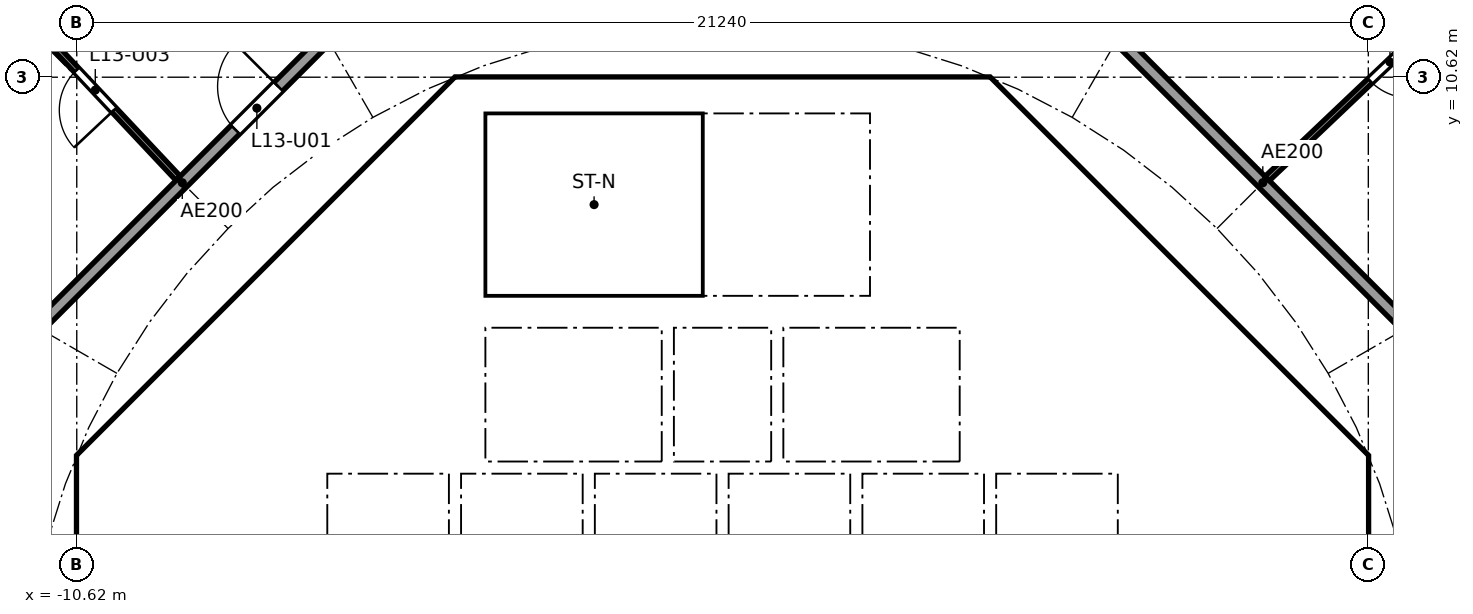
"""IFC4 building model, lengths in metres.
Left out: names, types, materials, properties, quantities, classifications, styles, units other than length and angle.
Written with IfcOpenShell. Run it as: python <this file> out.ifc"""

import sys

from ifc_helpers import new_model, si_unit, direction, frame, frame_2d, origin, place, context, subcontext, project, spatial, polyline, rectangle, outline, extrude, element, fill, save


model = new_model("IFC4")
c1 = context("Model", 3, precision=1e-05, world=origin(), true_north=direction((0.0, 1.0)))
c2 = subcontext(c1, "Body", "Model", "MODEL_VIEW")
j1 = project(units=[si_unit("LENGTHUNIT", "METRE"), si_unit("PLANEANGLEUNIT", "RADIAN")], contexts=[c1])
p1 = place(None, origin())
s1 = spatial("IfcSite", under=j1, at=p1, CompositionType="ELEMENT")
p2 = place(p1, origin())
s2 = spatial("IfcBuilding", under=s1, at=p2, CompositionType="ELEMENT")
p3 = place(p2, frame((0.0, 0.0, 56.6)))
s3 = spatial("IfcBuildingStorey", under=s2, at=p3, CompositionType="ELEMENT", Elevation=56.6)
p4 = place(p3, frame((9.988, 4.613, 0.0), z_axis=(0.0, 0.0, 1.0), x_axis=(-0.707106781187, 0.707106781187, 0.0)))
e1 = element("IfcWall", 1, at=p4, inside=s3, PredefinedType="SHEAR", context=c2, shape_type="SweptSolid", body=[
    extrude(rectangle(XDim=7.602, YDim=0.6, at=frame_2d((3.801, 0.0))), origin(), (0.0, 0.0, 1.0), 3.44),
])
p5 = place(p4, frame((3.201, 0.0, 0.0)))
e2 = element("IfcOpeningElement", 2, at=p5, cuts=e1, PredefinedType="OPENING", context=c2, shape_type="SweptSolid", body=[
    extrude(rectangle(XDim=1.2, YDim=2.1, at=frame_2d((0.6, 1.05))), frame((0.0, 0.31, 0.0), z_axis=(0.0, -1.0, 0.0), x_axis=(1.0, 0.0, 0.0)), (0.0, 0.0, 1.0), 0.62),
])
p6 = place(p3, frame((-4.613, 9.988, 0.0), z_axis=(0.0, 0.0, 1.0), x_axis=(-0.707106781187, -0.707106781187, 0.0)))
e3 = element("IfcWall", 3, at=p6, inside=s3, PredefinedType="SHEAR", context=c2, shape_type="SweptSolid", body=[
    extrude(rectangle(XDim=7.602, YDim=0.6, at=frame_2d((3.801, 0.0))), origin(), (0.0, 0.0, 1.0), 3.44),
])
p7 = place(p6, frame((0.351, 0.0, 0.0)))
e4 = element("IfcOpeningElement", 4, at=p7, cuts=e3, PredefinedType="OPENING", context=c2, shape_type="SweptSolid", body=[
    extrude(rectangle(XDim=1.1, YDim=2.1, at=frame_2d((0.55, 1.05))), frame((0.0, 0.31, 0.0), z_axis=(0.0, -1.0, 0.0), x_axis=(1.0, 0.0, 0.0)), (0.0, 0.0, 1.0), 0.62),
])
p8 = place(p3, frame((-10.325, 3.801, 0.0), z_axis=(0.0, 0.0, 1.0), x_axis=(0.0, -1.0, 0.0)))
e5 = element("IfcWall", 5, at=p8, inside=s3, PredefinedType="SHEAR", context=c2, shape_type="SweptSolid", body=[
    extrude(rectangle(XDim=7.602, YDim=0.6, at=frame_2d((3.801, 0.0))), origin(), (0.0, 0.0, 1.0), 3.44),
])
p9 = place(p8, frame((0.651, 0.0, 0.0)))
e6 = element("IfcOpeningElement", 6, at=p9, cuts=e5, PredefinedType="OPENING", context=c2, shape_type="SweptSolid", body=[
    extrude(rectangle(XDim=1.5, YDim=2.1, at=frame_2d((0.75, 1.05))), frame((0.0, 0.31, 0.0), z_axis=(0.0, -1.0, 0.0), x_axis=(1.0, 0.0, 0.0)), (0.0, 0.0, 1.0), 0.62),
])
p10 = place(p8, frame((5.451, 0.0, 0.0)))
e7 = element("IfcOpeningElement", 7, at=p10, cuts=e5, PredefinedType="OPENING", context=c2, shape_type="SweptSolid", body=[
    extrude(rectangle(XDim=1.5, YDim=2.1, at=frame_2d((0.75, 1.05))), frame((0.0, 0.31, 0.0), z_axis=(0.0, -1.0, 0.0), x_axis=(1.0, 0.0, 0.0)), (0.0, 0.0, 1.0), 0.62),
])
p11 = place(p3, frame((-5.8, 4.3, 0.0), z_axis=(0.0, 0.0, 1.0), x_axis=(0.0, 1.0, 0.0)))
e8 = element("IfcWall", 8, at=p11, inside=s3, PredefinedType="PARTITIONING", context=c2, shape_type="SweptSolid", body=[
    extrude(rectangle(XDim=3.927, YDim=0.15, at=frame_2d((1.963, 0.0))), origin(), (0.0, 0.0, 1.0), 3.44),
])
p12 = place(p11, frame((0.413, 0.0, 0.0)))
e9 = element("IfcOpeningElement", 9, at=p12, cuts=e8, PredefinedType="OPENING", context=c2, shape_type="SweptSolid", body=[
    extrude(rectangle(XDim=0.9, YDim=2.1, at=frame_2d((0.45, 1.05))), frame((0.0, 0.085, 0.0), z_axis=(0.0, -1.0, 0.0), x_axis=(1.0, 0.0, 0.0)), (0.0, 0.0, 1.0), 0.17),
])
p13 = place(p11, frame((2.489, 0.0, 0.0)))
e10 = element("IfcOpeningElement", 10, at=p13, cuts=e8, PredefinedType="OPENING", context=c2, shape_type="SweptSolid", body=[
    extrude(rectangle(XDim=0.9, YDim=2.1, at=frame_2d((0.45, 1.05))), frame((0.0, 0.085, 0.0), z_axis=(0.0, -1.0, 0.0), x_axis=(1.0, 0.0, 0.0)), (0.0, 0.0, 1.0), 0.17),
])
p14 = place(p3, frame((4.0, 4.3, 0.0), z_axis=(0.0, 0.0, 1.0), x_axis=(0.0, 1.0, 0.0)))
e11 = element("IfcWall", 11, at=p14, inside=s3, PredefinedType="SOLIDWALL", context=c2, shape_type="SweptSolid", body=[
    extrude(rectangle(XDim=2.2, YDim=0.2, at=frame_2d((1.1, 0.0))), origin(), (0.0, 0.0, 1.0), 3.44),
])
p15 = place(p14, frame((0.55, 0.0, 0.0)))
e12 = element("IfcOpeningElement", 12, at=p15, cuts=e11, PredefinedType="OPENING", context=c2, shape_type="SweptSolid", body=[
    extrude(rectangle(XDim=1.1, YDim=2.1, at=frame_2d((0.55, 1.05))), frame((0.0, 0.11, 0.0), z_axis=(0.0, -1.0, 0.0), x_axis=(1.0, 0.0, 0.0)), (0.0, 0.0, 1.0), 0.22),
])
p16 = place(p3, frame((-4.0, 4.3, 0.0), z_axis=(0.0, 0.0, 1.0), x_axis=(0.0, 1.0, 0.0)))
e13 = element("IfcWall", 13, at=p16, inside=s3, PredefinedType="SOLIDWALL", context=c2, shape_type="SweptSolid", body=[
    extrude(rectangle(XDim=2.2, YDim=0.2, at=frame_2d((1.1, 0.0))), origin(), (0.0, 0.0, 1.0), 3.44),
])
p17 = place(p16, frame((0.55, 0.0, 0.0)))
e14 = element("IfcOpeningElement", 14, at=p17, cuts=e13, PredefinedType="OPENING", context=c2, shape_type="SweptSolid", body=[
    extrude(rectangle(XDim=1.1, YDim=2.1, at=frame_2d((0.55, 1.05))), frame((0.0, 0.11, 0.0), z_axis=(0.0, -1.0, 0.0), x_axis=(1.0, 0.0, 0.0)), (0.0, 0.0, 1.0), 0.22),
])
p18 = place(p3, frame((6.7, 4.0, 0.0), z_axis=(0.0, 0.0, 1.0), x_axis=(1.0, 0.0, 0.0)))
e15 = element("IfcWall", 15, at=p18, inside=s3, PredefinedType="SOLIDWALL", context=c2, shape_type="SweptSolid", body=[
    extrude(rectangle(XDim=3.325, YDim=0.2, at=frame_2d((1.662, 0.0))), origin(), (0.0, 0.0, 1.0), 3.44),
])
p19 = place(p18, frame((1.25, 0.0, 0.0)))
e16 = element("IfcOpeningElement", 16, at=p19, cuts=e15, PredefinedType="OPENING", context=c2, shape_type="SweptSolid", body=[
    extrude(rectangle(XDim=1.1, YDim=2.1, at=frame_2d((0.55, 1.05))), frame((0.0, 0.11, 0.0), z_axis=(0.0, -1.0, 0.0), x_axis=(1.0, 0.0, 0.0)), (0.0, 0.0, 1.0), 0.22),
])
p20 = place(p3, frame((4.0, 7.025, 0.0), z_axis=(0.0, 0.0, 1.0), x_axis=(0.0, 1.0, 0.0)))
e17 = element("IfcWall", 17, at=p20, inside=s3, PredefinedType="SOLIDWALL", context=c2, shape_type="SweptSolid", body=[
    extrude(rectangle(XDim=3.0, YDim=0.2, at=frame_2d((1.5, 0.0))), origin(), (0.0, 0.0, 1.0), 3.44),
])
p21 = place(p20, frame((0.925, 0.0, 0.0)))
e18 = element("IfcOpeningElement", 18, at=p21, cuts=e17, PredefinedType="OPENING", context=c2, shape_type="SweptSolid", body=[
    extrude(rectangle(XDim=1.1, YDim=2.1, at=frame_2d((0.55, 1.05))), frame((0.0, 0.11, 0.0), z_axis=(0.0, -1.0, 0.0), x_axis=(1.0, 0.0, 0.0)), (0.0, 0.0, 1.0), 0.22),
])
p22 = place(p3, origin())
e19 = element("IfcWall", 19, at=p22, inside=s3, PredefinedType="SHEAR", context=c2, shape_type="SweptSolid", body=[
    extrude(outline(polyline([(-10.2, 4.825), (-9.776, 4.401), (-10.025, 4.152), (-10.025, 3.801), (-10.625, 3.801), (-10.625, 4.401), (-10.2, 4.825)])), origin(), (0.0, 0.0, 1.0), 3.44),
])
p23 = place(p3, origin())
e20 = element("IfcWall", 20, at=p23, inside=s3, PredefinedType="SHEAR", context=c2, shape_type="SweptSolid", body=[
    extrude(outline(polyline([(-4.152, 10.025), (-4.401, 9.776), (-4.825, 10.2), (-4.401, 10.625), (4.401, 10.625), (4.825, 10.2), (4.401, 9.776), (4.152, 10.025), (-4.152, 10.025)])), origin(), (0.0, 0.0, 1.0), 3.44),
])
p24 = place(p3, origin())
e21 = element("IfcWall", 21, at=p24, inside=s3, PredefinedType="SHEAR", context=c2, shape_type="SweptSolid", body=[
    extrude(outline(polyline([(9.776, -4.401), (10.025, -4.152), (10.025, -3.801), (10.025, 4.152), (9.776, 4.401), (10.2, 4.825), (10.625, 4.401), (10.625, -4.401), (10.2, -4.825), (9.776, -4.401)])), origin(), (0.0, 0.0, 1.0), 3.44),
])
p25 = place(p3, frame((-10.025, 4.0, 0.0), z_axis=(0.0, 0.0, 1.0), x_axis=(1.0, 0.0, 0.0)))
e22 = element("IfcWall", 22, at=p25, inside=s3, PredefinedType="PARTITIONING", context=c2, shape_type="SweptSolid", body=[
    extrude(rectangle(XDim=3.325, YDim=0.2, at=frame_2d((1.662, 0.0))), origin(), (0.0, 0.0, 1.0), 3.44),
])
p26 = place(p3, frame((-8.001, 6.1, 0.0), z_axis=(0.0, 0.0, 1.0), x_axis=(1.0, 0.0, 0.0)))
e23 = element("IfcWall", 23, at=p26, inside=s3, PredefinedType="PARTITIONING", context=c2, shape_type="SweptSolid", body=[
    extrude(rectangle(XDim=2.126, YDim=0.15, at=frame_2d((1.063, 0.0))), origin(), (0.0, 0.0, 1.0), 3.44),
])
for number, where, z_axis, x_axis in (
    (24, (-0.9, 4.3, 0.0), (0.0, 0.0, 1.0), (0.0, 1.0, 0.0)),
    (25, (0.9, 4.3, 0.0), (0.0, 0.0, 1.0), (0.0, 1.0, 0.0)),
):
    element("IfcWall", number, at=place(p3, frame(where, z_axis=z_axis, x_axis=x_axis)), inside=s3, PredefinedType="SOLIDWALL", context=c2, shape_type="SweptSolid", body=[
        extrude(rectangle(XDim=2.2, YDim=0.2, at=frame_2d((1.1, 0.0))), origin(), (0.0, 0.0, 1.0), 3.44),
    ])
p27 = place(p3, origin())
e26 = element("IfcWall", 26, at=p27, inside=s3, PredefinedType="SOLIDWALL", context=c2, shape_type="SweptSolid", body=[
    extrude(outline(polyline([(-6.5, 2.1), (-6.7, 2.1), (-6.7, 4.3), (6.7, 4.3), (6.7, 2.1), (6.5, 2.1), (6.5, 4.1), (4.5, 4.1), (4.5, 2.1), (4.3, 2.1), (4.3, 4.1), (2.3, 4.1), (2.3, 2.1), (2.1, 2.1), (2.1, 4.1), (0.1, 4.1), (0.1, 2.1), (-0.1, 2.1), (-0.1, 4.1), (-2.1, 4.1), (-2.1, 2.1), (-2.3, 2.1), (-2.3, 4.1), (-4.3, 4.1), (-4.3, 2.1), (-4.5, 2.1), (-4.5, 4.1), (-6.5, 4.1), (-6.5, 2.1)])), origin(), (0.0, 0.0, 1.0), 3.44),
])
p28 = place(p3, origin())
e27 = element("IfcWall", 27, at=p28, inside=s3, PredefinedType="SOLIDWALL", context=c2, shape_type="SweptSolid", body=[
    extrude(outline(polyline([(-3.9, 7.025), (-4.1, 7.025), (-4.1, 10.025), (-3.9, 10.025), (-3.9, 7.025)])), origin(), (0.0, 0.0, 1.0), 3.44),
])
p29 = place(p3, origin())
e28 = element("IfcWall", 28, at=p29, inside=s3, PredefinedType="SOLIDWALL", context=c2, shape_type="SweptSolid", body=[
    extrude(outline(polyline([(4.1, 6.5), (-4.1, 6.5), (-4.1, 7.025), (4.1, 7.025), (4.1, 6.5)])), origin(), (0.0, 0.0, 1.0), 3.44),
])
p30 = place(p3, origin())
e29 = element("IfcWall", 29, at=p30, inside=s3, PredefinedType="SOLIDWALL", context=c2, shape_type="SweptSolid", body=[
    extrude(outline(polyline([(7.025, -3.9), (6.7, -3.9), (6.7, 3.9), (7.025, 3.9), (7.025, -3.9)])), origin(), (0.0, 0.0, 1.0), 3.44),
])
p31 = place(p3, frame((12.635, 5.134, 0.0), z_axis=(0.0, 0.0, 1.0), x_axis=(-0.707106781187, 0.707106781187, 0.0)))
e30 = element("IfcWall", 30, at=p31, inside=s3, PredefinedType="PARTITIONING", context=c2, shape_type="SweptSolid", body=[
    extrude(rectangle(XDim=10.609, YDim=0.2, at=frame_2d((5.305, 0.0))), origin(), (0.0, 0.0, 1.0), 3.44),
])
p32 = place(p3, frame((-5.275, 12.494, 0.0), z_axis=(0.0, 0.0, 1.0), x_axis=(-0.707106781187, -0.707106781187, 0.0)))
e31 = element("IfcWall", 31, at=p32, inside=s3, PredefinedType="PARTITIONING", context=c2, shape_type="SweptSolid", body=[
    extrude(rectangle(XDim=10.209, YDim=0.2, at=frame_2d((5.104, 0.0))), origin(), (0.0, 0.0, 1.0), 3.44),
])
p33 = place(p32, frame((2.87, 0.0, 0.0)))
e32 = element("IfcOpeningElement", 32, at=p33, cuts=e31, PredefinedType="OPENING", context=c2, shape_type="SweptSolid", body=[
    extrude(rectangle(XDim=1.0, YDim=2.1, at=frame_2d((0.5, 1.05))), frame((0.0, 0.11, 0.0), z_axis=(0.0, -1.0, 0.0), x_axis=(1.0, 0.0, 0.0)), (0.0, 0.0, 1.0), 0.22),
])
p34 = place(p3, frame((8.957, 8.953, 0.0), z_axis=(0.0, 0.0, 1.0), x_axis=(0.725250022034, 0.688485588476, 0.0)))
e33 = element("IfcWall", 33, at=p34, inside=s3, PredefinedType="PARTITIONING", context=c2, shape_type="SweptSolid", body=[
    extrude(rectangle(XDim=12.963, YDim=0.1, at=frame_2d((6.481, 0.0))), origin(), (0.0, 0.0, 1.0), 2.687),
])
p35 = place(p34, frame((2.333, 0.0, 0.0)))
e34 = element("IfcOpeningElement", 34, at=p35, cuts=e33, PredefinedType="OPENING", context=c2, shape_type="SweptSolid", body=[
    extrude(rectangle(XDim=0.9, YDim=2.1, at=frame_2d((0.45, 1.05))), frame((0.0, 0.06, 0.0), z_axis=(0.0, -1.0, 0.0), x_axis=(1.0, 0.0, 0.0)), (0.0, 0.0, 1.0), 0.12),
])
p36 = place(p34, frame((8.79, 0.0, 0.0)))
e35 = element("IfcOpeningElement", 35, at=p36, cuts=e33, PredefinedType="OPENING", context=c2, shape_type="SweptSolid", body=[
    extrude(rectangle(XDim=0.9, YDim=2.1, at=frame_2d((0.45, 1.05))), frame((0.0, 0.06, 0.0), z_axis=(0.0, -1.0, 0.0), x_axis=(1.0, 0.0, 0.0)), (0.0, 0.0, 1.0), 0.12),
])
p37 = place(p3, frame((-8.953, 8.958, 0.0), z_axis=(0.0, 0.0, 1.0), x_axis=(-0.684574307023, 0.728943082939, 0.0)))
e36 = element("IfcWall", 36, at=p37, inside=s3, PredefinedType="PARTITIONING", context=c2, shape_type="SweptSolid", body=[
    extrude(rectangle(XDim=15.231, YDim=0.1, at=frame_2d((7.615, 0.0))), origin(), (0.0, 0.0, 1.0), 2.687),
])
p38 = place(p37, frame((1.54, 0.0, 0.0)))
e37 = element("IfcOpeningElement", 37, at=p38, cuts=e36, PredefinedType="OPENING", context=c2, shape_type="SweptSolid", body=[
    extrude(rectangle(XDim=0.9, YDim=2.1, at=frame_2d((0.45, 1.05))), frame((0.0, 0.06, 0.0), z_axis=(0.0, -1.0, 0.0), x_axis=(1.0, 0.0, 0.0)), (0.0, 0.0, 1.0), 0.12),
])
p39 = place(p37, frame((6.174, 0.0, 0.0)))
e38 = element("IfcOpeningElement", 38, at=p39, cuts=e36, PredefinedType="OPENING", context=c2, shape_type="SweptSolid", body=[
    extrude(rectangle(XDim=0.9, YDim=2.1, at=frame_2d((0.45, 1.05))), frame((0.0, 0.06, 0.0), z_axis=(0.0, -1.0, 0.0), x_axis=(1.0, 0.0, 0.0)), (0.0, 0.0, 1.0), 0.12),
])
p40 = place(p37, frame((11.8, 0.0, 0.0)))
e39 = element("IfcOpeningElement", 39, at=p40, cuts=e36, PredefinedType="OPENING", context=c2, shape_type="SweptSolid", body=[
    extrude(rectangle(XDim=0.9, YDim=2.1, at=frame_2d((0.45, 1.05))), frame((0.0, 0.06, 0.0), z_axis=(0.0, -1.0, 0.0), x_axis=(1.0, 0.0, 0.0)), (0.0, 0.0, 1.0), 0.12),
])
p41 = place(p15, origin())
e40 = element("IfcDoor", 40, at=p41, inside=s3, OperationType="DOUBLE_DOOR_SLIDING", PredefinedType="DOOR", context=c2, shape_type="SweptSolid", body=[
    extrude(rectangle(XDim=1.1, YDim=2.1, at=frame_2d((0.55, 1.05))), frame((0.0, 0.025, 0.0), z_axis=(0.0, -1.0, 0.0), x_axis=(1.0, 0.0, 0.0)), (0.0, 0.0, 1.0), 0.05),
])
fill(e12, e40)
p42 = place(p17, origin())
e41 = element("IfcDoor", 41, at=p42, inside=s3, OperationType="DOUBLE_DOOR_SLIDING", PredefinedType="DOOR", context=c2, shape_type="SweptSolid", body=[
    extrude(rectangle(XDim=1.1, YDim=2.1, at=frame_2d((0.55, 1.05))), frame((0.0, 0.025, 0.0), z_axis=(0.0, -1.0, 0.0), x_axis=(1.0, 0.0, 0.0)), (0.0, 0.0, 1.0), 0.05),
])
fill(e14, e41)
p43 = place(p19, frame((1.1, 0.0, 0.0), x_axis=(-1.0, 0.0, 0.0)))
e42 = element("IfcDoor", 42, at=p43, inside=s3, OperationType="SINGLE_SWING_RIGHT", PredefinedType="DOOR", context=c2, shape_type="SweptSolid", body=[
    extrude(rectangle(XDim=1.1, YDim=2.1, at=frame_2d((0.55, 1.05))), frame((0.0, 0.025, 0.0), z_axis=(0.0, -1.0, 0.0), x_axis=(1.0, 0.0, 0.0)), (0.0, 0.0, 1.0), 0.05),
])
fill(e16, e42)
p44 = place(p21, origin())
e43 = element("IfcDoor", 43, at=p44, inside=s3, OperationType="SINGLE_SWING_LEFT", PredefinedType="DOOR", context=c2, shape_type="SweptSolid", body=[
    extrude(rectangle(XDim=1.1, YDim=2.1, at=frame_2d((0.55, 1.05))), frame((0.0, 0.025, 0.0), z_axis=(0.0, -1.0, 0.0), x_axis=(1.0, 0.0, 0.0)), (0.0, 0.0, 1.0), 0.05),
])
fill(e18, e43)
p45 = place(p12, origin())
e44 = element("IfcDoor", 44, at=p45, inside=s3, OperationType="SINGLE_SWING_RIGHT", PredefinedType="DOOR", context=c2, shape_type="SweptSolid", body=[
    extrude(rectangle(XDim=0.9, YDim=2.1, at=frame_2d((0.45, 1.05))), frame((0.0, 0.025, 0.0), z_axis=(0.0, -1.0, 0.0), x_axis=(1.0, 0.0, 0.0)), (0.0, 0.0, 1.0), 0.05),
])
fill(e9, e44)
p46 = place(p13, origin())
e45 = element("IfcDoor", 45, at=p46, inside=s3, OperationType="SINGLE_SWING_RIGHT", PredefinedType="DOOR", context=c2, shape_type="SweptSolid", body=[
    extrude(rectangle(XDim=0.9, YDim=2.1, at=frame_2d((0.45, 1.05))), frame((0.0, 0.025, 0.0), z_axis=(0.0, -1.0, 0.0), x_axis=(1.0, 0.0, 0.0)), (0.0, 0.0, 1.0), 0.05),
])
fill(e10, e45)
p47 = place(p5, origin())
e46 = element("IfcDoor", 46, at=p47, inside=s3, OperationType="SINGLE_SWING_LEFT", PredefinedType="DOOR", context=c2, shape_type="SweptSolid", body=[
    extrude(rectangle(XDim=1.2, YDim=2.1, at=frame_2d((0.6, 1.05))), frame((0.0, 0.025, 0.0), z_axis=(0.0, -1.0, 0.0), x_axis=(1.0, 0.0, 0.0)), (0.0, 0.0, 1.0), 0.05),
])
fill(e2, e46)
p48 = place(p9, origin())
e47 = element("IfcDoor", 47, at=p48, inside=s3, OperationType="DOUBLE_DOOR_SINGLE_SWING", PredefinedType="DOOR", context=c2, shape_type="SweptSolid", body=[
    extrude(rectangle(XDim=1.5, YDim=2.1, at=frame_2d((0.75, 1.05))), frame((0.0, 0.025, 0.0), z_axis=(0.0, -1.0, 0.0), x_axis=(1.0, 0.0, 0.0)), (0.0, 0.0, 1.0), 0.05),
])
fill(e6, e47)
p49 = place(p7, origin())
e48 = element("IfcDoor", 48, at=p49, inside=s3, OperationType="SINGLE_SWING_LEFT", PredefinedType="DOOR", context=c2, shape_type="SweptSolid", body=[
    extrude(rectangle(XDim=1.1, YDim=2.1, at=frame_2d((0.55, 1.05))), frame((0.0, 0.025, 0.0), z_axis=(0.0, -1.0, 0.0), x_axis=(1.0, 0.0, 0.0)), (0.0, 0.0, 1.0), 0.05),
])
fill(e4, e48)
p50 = place(p33, frame((1.0, 0.0, 0.0), x_axis=(-1.0, 0.0, 0.0)))
e49 = element("IfcDoor", 49, at=p50, inside=s3, OperationType="SINGLE_SWING_RIGHT", PredefinedType="DOOR", context=c2, shape_type="SweptSolid", body=[
    extrude(rectangle(XDim=1.0, YDim=2.1, at=frame_2d((0.5, 1.05))), frame((0.0, 0.025, 0.0), z_axis=(0.0, -1.0, 0.0), x_axis=(1.0, 0.0, 0.0)), (0.0, 0.0, 1.0), 0.05),
])
fill(e32, e49)
p51 = place(p38, origin())
e50 = element("IfcDoor", 50, at=p51, inside=s3, OperationType="SINGLE_SWING_LEFT", PredefinedType="DOOR", context=c2, shape_type="SweptSolid", body=[
    extrude(rectangle(XDim=0.9, YDim=2.1, at=frame_2d((0.45, 1.05))), frame((0.0, 0.025, 0.0), z_axis=(0.0, -1.0, 0.0), x_axis=(1.0, 0.0, 0.0)), (0.0, 0.0, 1.0), 0.05),
])
fill(e37, e50)
p52 = place(p35, frame((0.9, 0.0, 0.0), x_axis=(-1.0, 0.0, 0.0)))
e51 = element("IfcDoor", 51, at=p52, inside=s3, OperationType="SINGLE_SWING_LEFT", PredefinedType="DOOR", context=c2, shape_type="SweptSolid", body=[
    extrude(rectangle(XDim=0.9, YDim=2.1, at=frame_2d((0.45, 1.05))), frame((0.0, 0.025, 0.0), z_axis=(0.0, -1.0, 0.0), x_axis=(1.0, 0.0, 0.0)), (0.0, 0.0, 1.0), 0.05),
])
fill(e34, e51)
save(model, sys.argv[1])
